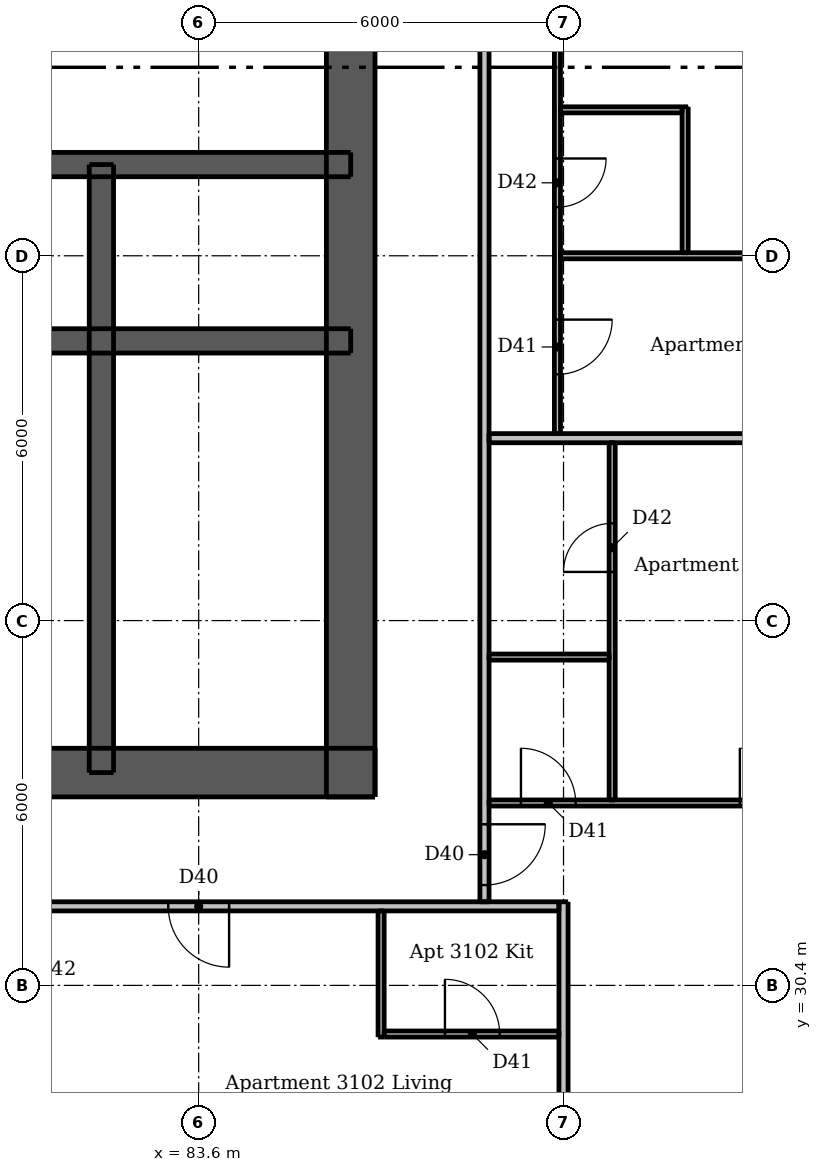
"""IFC4 building model, lengths in metres.
Left out: names, types, materials, properties, quantities, classifications, styles, units other than length and angle.
Written with IfcOpenShell. Run it as: python <this file> out.ifc"""

import sys

from ifc_helpers import new_model, si_unit, direction, frame, frame_2d, origin, place, context, subcontext, project, spatial, rectangle, extrude, element, fill, save


model = new_model("IFC4")
c1 = context("Model", 3, precision=1e-05, world=origin(), true_north=direction((0.0, 1.0)))
c2 = subcontext(c1, "Body", "Model", "MODEL_VIEW")
j1 = project(units=[si_unit("LENGTHUNIT", "METRE"), si_unit("PLANEANGLEUNIT", "RADIAN")], contexts=[c1])
p1 = place(None, origin())
s1 = spatial("IfcSite", under=j1, at=p1, CompositionType="ELEMENT")
p2 = place(p1, origin())
s2 = spatial("IfcBuilding", under=s1, at=p2, CompositionType="ELEMENT")
p3 = place(p2, frame((0.0, 0.0, 115.0)))
s3 = spatial("IfcBuildingStorey", under=s2, at=p3, CompositionType="ELEMENT", Elevation=115.0)
p4 = place(p3, frame((62.5, 33.9, 0.0), z_axis=(0.0, 0.0, 1.0), x_axis=(1.0, 0.0, 0.0)))
e1 = element("IfcWall", 1, at=p4, inside=s3, PredefinedType="SHEAR", context=c2, shape_type="SweptSolid", body=[
    extrude(rectangle(XDim=24.0, YDim=0.8, at=frame_2d((12.0, 0.0))), origin(), (0.0, 0.0, 1.0), 3.05),
])
p5 = place(p4, frame((2.0, 0.0, 0.0)))
e2 = element("IfcOpeningElement", 2, at=p5, cuts=e1, PredefinedType="OPENING", context=c2, shape_type="SweptSolid", body=[
    extrude(rectangle(XDim=1.1, YDim=2.1, at=frame_2d((0.55, 1.05))), frame((0.0, 0.41, 0.0), z_axis=(0.0, -1.0, 0.0), x_axis=(1.0, 0.0, 0.0)), (0.0, 0.0, 1.0), 0.82),
])
p6 = place(p4, frame((20.9, 0.0, 0.0)))
e3 = element("IfcOpeningElement", 3, at=p6, cuts=e1, PredefinedType="OPENING", context=c2, shape_type="SweptSolid", body=[
    extrude(rectangle(XDim=1.1, YDim=2.1, at=frame_2d((0.55, 1.05))), frame((0.0, 0.41, 0.0), z_axis=(0.0, -1.0, 0.0), x_axis=(1.0, 0.0, 0.0)), (0.0, 0.0, 1.0), 0.82),
])
p7 = place(p4, frame((8.0, 0.0, 0.0)))
e4 = element("IfcOpeningElement", 4, at=p7, cuts=e1, PredefinedType="OPENING", context=c2, shape_type="SweptSolid", body=[
    extrude(rectangle(XDim=1.1, YDim=2.1, at=frame_2d((0.55, 1.05))), frame((0.0, 0.41, 0.0), z_axis=(0.0, -1.0, 0.0), x_axis=(1.0, 0.0, 0.0)), (0.0, 0.0, 1.0), 0.82),
])
p8 = place(p4, frame((17.488, 0.0, 0.0)))
e5 = element("IfcOpeningElement", 5, at=p8, cuts=e1, PredefinedType="OPENING", context=c2, shape_type="SweptSolid", body=[
    extrude(rectangle(XDim=0.9, YDim=2.1, at=frame_2d((0.45, 1.05))), frame((0.0, 0.41, 0.0), z_axis=(0.0, -1.0, 0.0), x_axis=(1.0, 0.0, 0.0)), (0.0, 0.0, 1.0), 0.82),
])
p9 = place(p3, frame((86.1, 33.5, 0.0), z_axis=(0.0, 0.0, 1.0), x_axis=(0.0, 1.0, 0.0)))
e6 = element("IfcWall", 6, at=p9, inside=s3, PredefinedType="SHEAR", context=c2, shape_type="SweptSolid", body=[
    extrude(rectangle(XDim=24.0, YDim=0.8, at=frame_2d((12.0, 0.0))), origin(), (0.0, 0.0, 1.0), 3.05),
])
p10 = place(p9, frame((11.2, 0.0, 0.0)))
e7 = element("IfcOpeningElement", 7, at=p10, cuts=e6, PredefinedType="OPENING", context=c2, shape_type="SweptSolid", body=[
    extrude(rectangle(XDim=1.6, YDim=2.1, at=frame_2d((0.8, 1.05))), frame((0.0, 0.41, 0.0), z_axis=(0.0, -1.0, 0.0), x_axis=(1.0, 0.0, 0.0)), (0.0, 0.0, 1.0), 0.82),
])
p11 = place(p3, frame((62.9, 41.0, 0.0), z_axis=(0.0, 0.0, 1.0), x_axis=(1.0, 0.0, 0.0)))
e8 = element("IfcWall", 8, at=p11, inside=s3, PredefinedType="SHEAR", context=c2, shape_type="SweptSolid", body=[
    extrude(rectangle(XDim=23.2, YDim=0.4, at=frame_2d((11.6, 0.0))), origin(), (0.0, 0.0, 1.0), 3.05),
])
p12 = place(p3, frame((62.9, 43.9, 0.0), z_axis=(0.0, 0.0, 1.0), x_axis=(1.0, 0.0, 0.0)))
e9 = element("IfcWall", 9, at=p12, inside=s3, PredefinedType="SHEAR", context=c2, shape_type="SweptSolid", body=[
    extrude(rectangle(XDim=23.2, YDim=0.4, at=frame_2d((11.6, 0.0))), origin(), (0.0, 0.0, 1.0), 3.05),
])
p13 = place(p12, frame((1.7, 0.0, 0.0)))
e10 = element("IfcOpeningElement", 10, at=p13, cuts=e9, PredefinedType="OPENING", context=c2, shape_type="SweptSolid", body=[
    extrude(rectangle(XDim=0.9, YDim=2.1, at=frame_2d((0.45, 1.05))), frame((0.0, 0.21, 0.0), z_axis=(0.0, -1.0, 0.0), x_axis=(1.0, 0.0, 0.0)), (0.0, 0.0, 1.0), 0.42),
])
p14 = place(p12, frame((20.6, 0.0, 0.0)))
e11 = element("IfcOpeningElement", 11, at=p14, cuts=e9, PredefinedType="OPENING", context=c2, shape_type="SweptSolid", body=[
    extrude(rectangle(XDim=0.9, YDim=2.1, at=frame_2d((0.45, 1.05))), frame((0.0, 0.21, 0.0), z_axis=(0.0, -1.0, 0.0), x_axis=(1.0, 0.0, 0.0)), (0.0, 0.0, 1.0), 0.42),
])
p15 = place(p12, frame((4.8, 0.0, 0.0)))
e12 = element("IfcOpeningElement", 12, at=p15, cuts=e9, PredefinedType="OPENING", context=c2, shape_type="SweptSolid", body=[
    extrude(rectangle(XDim=1.1, YDim=2.1, at=frame_2d((0.55, 1.05))), frame((0.0, 0.21, 0.0), z_axis=(0.0, -1.0, 0.0), x_axis=(1.0, 0.0, 0.0)), (0.0, 0.0, 1.0), 0.42),
])
p16 = place(p12, frame((7.3, 0.0, 0.0)))
e13 = element("IfcOpeningElement", 13, at=p16, cuts=e9, PredefinedType="OPENING", context=c2, shape_type="SweptSolid", body=[
    extrude(rectangle(XDim=1.1, YDim=2.1, at=frame_2d((0.55, 1.05))), frame((0.0, 0.21, 0.0), z_axis=(0.0, -1.0, 0.0), x_axis=(1.0, 0.0, 0.0)), (0.0, 0.0, 1.0), 0.42),
])
p17 = place(p12, frame((9.8, 0.0, 0.0)))
e14 = element("IfcOpeningElement", 14, at=p17, cuts=e9, PredefinedType="OPENING", context=c2, shape_type="SweptSolid", body=[
    extrude(rectangle(XDim=1.1, YDim=2.1, at=frame_2d((0.55, 1.05))), frame((0.0, 0.21, 0.0), z_axis=(0.0, -1.0, 0.0), x_axis=(1.0, 0.0, 0.0)), (0.0, 0.0, 1.0), 0.42),
])
p18 = place(p12, frame((12.3, 0.0, 0.0)))
e15 = element("IfcOpeningElement", 15, at=p18, cuts=e9, PredefinedType="OPENING", context=c2, shape_type="SweptSolid", body=[
    extrude(rectangle(XDim=1.1, YDim=2.1, at=frame_2d((0.55, 1.05))), frame((0.0, 0.21, 0.0), z_axis=(0.0, -1.0, 0.0), x_axis=(1.0, 0.0, 0.0)), (0.0, 0.0, 1.0), 0.42),
])
p19 = place(p12, frame((14.8, 0.0, 0.0)))
e16 = element("IfcOpeningElement", 16, at=p19, cuts=e9, PredefinedType="OPENING", context=c2, shape_type="SweptSolid", body=[
    extrude(rectangle(XDim=1.1, YDim=2.1, at=frame_2d((0.55, 1.05))), frame((0.0, 0.21, 0.0), z_axis=(0.0, -1.0, 0.0), x_axis=(1.0, 0.0, 0.0)), (0.0, 0.0, 1.0), 0.42),
])
p20 = place(p12, frame((17.3, 0.0, 0.0)))
e17 = element("IfcOpeningElement", 17, at=p20, cuts=e9, PredefinedType="OPENING", context=c2, shape_type="SweptSolid", body=[
    extrude(rectangle(XDim=1.1, YDim=2.1, at=frame_2d((0.55, 1.05))), frame((0.0, 0.21, 0.0), z_axis=(0.0, -1.0, 0.0), x_axis=(1.0, 0.0, 0.0)), (0.0, 0.0, 1.0), 0.42),
])
p21 = place(p3, frame((82.0, 33.9, 0.0), z_axis=(0.0, 0.0, 1.0), x_axis=(0.0, 1.0, 0.0)))
e18 = element("IfcWall", 18, at=p21, inside=s3, PredefinedType="SHEAR", context=c2, shape_type="SweptSolid", body=[
    extrude(rectangle(XDim=10.0, YDim=0.4, at=frame_2d((5.0, 0.0))), origin(), (0.0, 0.0, 1.0), 3.05),
])
p22 = place(p3, frame((86.6, 29.55, 0.0), z_axis=(0.0, 0.0, 1.0), x_axis=(0.0, 1.0, 0.0)))
e19 = element("IfcWall", 19, at=p22, inside=s3, PredefinedType="PARTITIONING", context=c2, shape_type="SweptSolid", body=[
    extrude(rectangle(XDim=2.075, YDim=0.1, at=frame_2d((1.038, 0.0))), origin(), (0.0, 0.0, 1.0), 3.05),
])
p23 = place(p3, frame((89.5, 54.325, 0.0), z_axis=(0.0, 0.0, 1.0), x_axis=(0.0, -1.0, 0.0)))
e20 = element("IfcWall", 20, at=p23, inside=s3, PredefinedType="PARTITIONING", context=c2, shape_type="SweptSolid", body=[
    extrude(rectangle(XDim=14.85, YDim=0.1, at=frame_2d((7.425, 0.0))), origin(), (0.0, 0.0, 1.0), 3.05),
])
p24 = place(p23, frame((5.775, 0.0, 0.0)))
e21 = element("IfcOpeningElement", 21, at=p24, cuts=e20, PredefinedType="OPENING", context=c2, shape_type="SweptSolid", body=[
    extrude(rectangle(XDim=0.9, YDim=2.1, at=frame_2d((0.45, 1.05))), frame((0.0, 0.06, 0.0), z_axis=(0.0, -1.0, 0.0), x_axis=(1.0, 0.0, 0.0)), (0.0, 0.0, 1.0), 0.12),
])
p25 = place(p23, frame((0.975, 0.0, 0.0)))
e22 = element("IfcOpeningElement", 22, at=p25, cuts=e20, PredefinedType="OPENING", context=c2, shape_type="SweptSolid", body=[
    extrude(rectangle(XDim=0.9, YDim=2.1, at=frame_2d((0.45, 1.05))), frame((0.0, 0.06, 0.0), z_axis=(0.0, -1.0, 0.0), x_axis=(1.0, 0.0, 0.0)), (0.0, 0.0, 1.0), 0.12),
])
p26 = place(p23, frame((12.975, 0.0, 0.0)))
e23 = element("IfcOpeningElement", 23, at=p26, cuts=e20, PredefinedType="OPENING", context=c2, shape_type="SweptSolid", body=[
    extrude(rectangle(XDim=0.9, YDim=2.1, at=frame_2d((0.45, 1.05))), frame((0.0, 0.06, 0.0), z_axis=(0.0, -1.0, 0.0), x_axis=(1.0, 0.0, 0.0)), (0.0, 0.0, 1.0), 0.12),
])
p27 = place(p23, frame((10.325, 0.0, 0.0)))
e24 = element("IfcOpeningElement", 24, at=p27, cuts=e20, PredefinedType="OPENING", context=c2, shape_type="SweptSolid", body=[
    extrude(rectangle(XDim=0.8, YDim=2.1, at=frame_2d((0.4, 1.05))), frame((0.0, 0.06, 0.0), z_axis=(0.0, -1.0, 0.0), x_axis=(1.0, 0.0, 0.0)), (0.0, 0.0, 1.0), 0.12),
])
p28 = place(p3, frame((90.4, 33.45, 0.0), z_axis=(0.0, 0.0, 1.0), x_axis=(0.0, 1.0, 0.0)))
e25 = element("IfcWall", 25, at=p28, inside=s3, PredefinedType="PARTITIONING", context=c2, shape_type="SweptSolid", body=[
    extrude(rectangle(XDim=5.875, YDim=0.1, at=frame_2d((2.938, 0.0))), origin(), (0.0, 0.0, 1.0), 3.05),
])
p29 = place(p28, frame((3.75, 0.0, 0.0)))
e26 = element("IfcOpeningElement", 26, at=p29, cuts=e25, PredefinedType="OPENING", context=c2, shape_type="SweptSolid", body=[
    extrude(rectangle(XDim=0.8, YDim=2.1, at=frame_2d((0.4, 1.05))), frame((0.0, 0.06, 0.0), z_axis=(0.0, -1.0, 0.0), x_axis=(1.0, 0.0, 0.0)), (0.0, 0.0, 1.0), 0.12),
])
p30 = place(p3, frame((91.6, 42.45, 0.0), z_axis=(0.0, 0.0, 1.0), x_axis=(0.0, 1.0, 0.0)))
e27 = element("IfcWall", 27, at=p30, inside=s3, PredefinedType="PARTITIONING", context=c2, shape_type="SweptSolid", body=[
    extrude(rectangle(XDim=2.4, YDim=0.1, at=frame_2d((1.2, 0.0))), origin(), (0.0, 0.0, 1.0), 3.05),
])
p31 = place(p3, frame((89.55, 44.8, 0.0), z_axis=(0.0, 0.0, 1.0), x_axis=(1.0, 0.0, 0.0)))
e28 = element("IfcWall", 28, at=p31, inside=s3, PredefinedType="PARTITIONING", context=c2, shape_type="SweptSolid", body=[
    extrude(rectangle(XDim=2.0, YDim=0.1, at=frame_2d((1.0, 0.0))), origin(), (0.0, 0.0, 1.0), 3.05),
])
p32 = place(p3, frame((89.55, 42.4, 0.0), z_axis=(0.0, 0.0, 1.0), x_axis=(1.0, 0.0, 0.0)))
e29 = element("IfcWall", 29, at=p32, inside=s3, PredefinedType="PARTITIONING", context=c2, shape_type="SweptSolid", body=[
    extrude(rectangle(XDim=7.45, YDim=0.1, at=frame_2d((3.725, 0.0))), origin(), (0.0, 0.0, 1.0), 2.516),
])
p33 = place(p3, frame((88.375, 35.8, 0.0), z_axis=(0.0, 0.0, 1.0), x_axis=(1.0, 0.0, 0.0)))
e30 = element("IfcWall", 30, at=p33, inside=s3, PredefinedType="PARTITIONING", context=c2, shape_type="SweptSolid", body=[
    extrude(rectangle(XDim=1.975, YDim=0.1, at=frame_2d((0.988, 0.0))), origin(), (0.0, 0.0, 1.0), 3.05),
])
p34 = place(p3, frame((88.375, 33.4, 0.0), z_axis=(0.0, 0.0, 1.0), x_axis=(1.0, 0.0, 0.0)))
e31 = element("IfcWall", 31, at=p34, inside=s3, PredefinedType="PARTITIONING", context=c2, shape_type="SweptSolid", body=[
    extrude(rectangle(XDim=7.125, YDim=0.1, at=frame_2d((3.562, 0.0))), origin(), (0.0, 0.0, 1.0), 3.05),
])
p35 = place(p34, frame((0.525, 0.0, 0.0)))
e32 = element("IfcOpeningElement", 32, at=p35, cuts=e31, PredefinedType="OPENING", context=c2, shape_type="SweptSolid", body=[
    extrude(rectangle(XDim=0.9, YDim=2.1, at=frame_2d((0.45, 1.05))), frame((0.0, 0.06, 0.0), z_axis=(0.0, -1.0, 0.0), x_axis=(1.0, 0.0, 0.0)), (0.0, 0.0, 1.0), 0.12),
])
p36 = place(p34, frame((4.125, 0.0, 0.0)))
e33 = element("IfcOpeningElement", 33, at=p36, cuts=e31, PredefinedType="OPENING", context=c2, shape_type="SweptSolid", body=[
    extrude(rectangle(XDim=0.9, YDim=2.1, at=frame_2d((0.45, 1.05))), frame((0.0, 0.06, 0.0), z_axis=(0.0, -1.0, 0.0), x_axis=(1.0, 0.0, 0.0)), (0.0, 0.0, 1.0), 0.12),
])
p37 = place(p3, frame((86.65, 29.6, 0.0), z_axis=(0.0, 0.0, 1.0), x_axis=(1.0, 0.0, 0.0)))
e34 = element("IfcWall", 34, at=p37, inside=s3, PredefinedType="PARTITIONING", context=c2, shape_type="SweptSolid", body=[
    extrude(rectangle(XDim=2.875, YDim=0.1, at=frame_2d((1.438, 0.0))), origin(), (0.0, 0.0, 1.0), 3.05),
])
p38 = place(p37, frame((1.0, 0.0, 0.0)))
e35 = element("IfcOpeningElement", 35, at=p38, cuts=e34, PredefinedType="OPENING", context=c2, shape_type="SweptSolid", body=[
    extrude(rectangle(XDim=0.9, YDim=2.1, at=frame_2d((0.45, 1.05))), frame((0.0, 0.06, 0.0), z_axis=(0.0, -1.0, 0.0), x_axis=(1.0, 0.0, 0.0)), (0.0, 0.0, 1.0), 0.12),
])
p39 = place(p3, frame((88.3, 60.475, 0.0), z_axis=(0.0, 0.0, 1.0), x_axis=(0.0, -1.0, 0.0)))
e36 = element("IfcWall", 36, at=p39, inside=s3, PredefinedType="PARTITIONING", context=c2, shape_type="SweptSolid", body=[
    extrude(rectangle(XDim=28.7, YDim=0.15, at=frame_2d((14.35, 0.0))), origin(), (0.0, 0.0, 1.0), 3.05),
])
p40 = place(p39, frame((27.425, 0.0, 0.0)))
e37 = element("IfcOpeningElement", 37, at=p40, cuts=e36, PredefinedType="OPENING", context=c2, shape_type="SweptSolid", body=[
    extrude(rectangle(XDim=1.0, YDim=2.1, at=frame_2d((0.5, 1.05))), frame((0.0, 0.085, 0.0), z_axis=(0.0, -1.0, 0.0), x_axis=(1.0, 0.0, 0.0)), (0.0, 0.0, 1.0), 0.17),
])
p41 = place(p39, frame((13.075, 0.0, 0.0)))
e38 = element("IfcOpeningElement", 38, at=p41, cuts=e36, PredefinedType="OPENING", context=c2, shape_type="SweptSolid", body=[
    extrude(rectangle(XDim=1.0, YDim=2.1, at=frame_2d((0.5, 1.05))), frame((0.0, 0.085, 0.0), z_axis=(0.0, -1.0, 0.0), x_axis=(1.0, 0.0, 0.0)), (0.0, 0.0, 1.0), 0.17),
])
p42 = place(p39, frame((2.575, 0.0, 0.0)))
e39 = element("IfcOpeningElement", 39, at=p42, cuts=e36, PredefinedType="OPENING", context=c2, shape_type="SweptSolid", body=[
    extrude(rectangle(XDim=1.0, YDim=2.1, at=frame_2d((0.5, 1.05))), frame((0.0, 0.085, 0.0), z_axis=(0.0, -1.0, 0.0), x_axis=(1.0, 0.0, 0.0)), (0.0, 0.0, 1.0), 0.17),
])
p43 = place(p3, frame((89.6, 26.0, 0.0), z_axis=(0.0, 0.0, 1.0), x_axis=(0.0, 1.0, 0.0)))
e40 = element("IfcWall", 40, at=p43, inside=s3, PredefinedType="PARTITIONING", context=c2, shape_type="SweptSolid", body=[
    extrude(rectangle(XDim=5.775, YDim=0.15, at=frame_2d((2.887, 0.0))), origin(), (0.0, 0.0, 1.0), 2.516),
])
p44 = place(p3, frame((88.375, 39.4, 0.0), z_axis=(0.0, 0.0, 1.0), x_axis=(1.0, 0.0, 0.0)))
e41 = element("IfcWall", 41, at=p44, inside=s3, PredefinedType="PARTITIONING", context=c2, shape_type="SweptSolid", body=[
    extrude(rectangle(XDim=8.625, YDim=0.15, at=frame_2d((4.312, 0.0))), origin(), (0.0, 0.0, 1.0), 3.05),
])
p45 = place(p3, frame((89.525, 31.7, 0.0), z_axis=(0.0, 0.0, 1.0), x_axis=(-1.0, 0.0, 0.0)))
e42 = element("IfcWall", 42, at=p45, inside=s3, PredefinedType="PARTITIONING", context=c2, shape_type="SweptSolid", body=[
    extrude(rectangle(XDim=28.75, YDim=0.15, at=frame_2d((14.375, 0.0))), origin(), (0.0, 0.0, 1.0), 3.05),
])
p46 = place(p45, frame((24.625, 0.0, 0.0)))
e43 = element("IfcOpeningElement", 43, at=p46, cuts=e42, PredefinedType="OPENING", context=c2, shape_type="SweptSolid", body=[
    extrude(rectangle(XDim=1.0, YDim=2.1, at=frame_2d((0.5, 1.05))), frame((0.0, 0.085, 0.0), z_axis=(0.0, -1.0, 0.0), x_axis=(1.0, 0.0, 0.0)), (0.0, 0.0, 1.0), 0.17),
])
p47 = place(p45, frame((5.425, 0.0, 0.0)))
e44 = element("IfcOpeningElement", 44, at=p47, cuts=e42, PredefinedType="OPENING", context=c2, shape_type="SweptSolid", body=[
    extrude(rectangle(XDim=1.0, YDim=2.1, at=frame_2d((0.5, 1.05))), frame((0.0, 0.085, 0.0), z_axis=(0.0, -1.0, 0.0), x_axis=(1.0, 0.0, 0.0)), (0.0, 0.0, 1.0), 0.17),
])
p48 = place(p6, origin())
e45 = element("IfcDoor", 45, at=p48, inside=s3, OperationType="SINGLE_SWING_RIGHT", PredefinedType="DOOR", context=c2, shape_type="SweptSolid", body=[
    extrude(rectangle(XDim=1.1, YDim=2.1, at=frame_2d((0.55, 1.05))), frame((0.0, 0.388, 0.0), z_axis=(0.0, -1.0, 0.0), x_axis=(1.0, 0.0, 0.0)), (0.0, 0.0, 1.0), 0.05),
])
fill(e3, e45)
p49 = place(p10, origin())
e46 = element("IfcDoor", 46, at=p49, inside=s3, OperationType="DOUBLE_DOOR_SINGLE_SWING", PredefinedType="DOOR", context=c2, shape_type="SweptSolid", body=[
    extrude(rectangle(XDim=1.6, YDim=2.1, at=frame_2d((0.8, 1.05))), frame((0.0, 0.388, 0.0), z_axis=(0.0, -1.0, 0.0), x_axis=(1.0, 0.0, 0.0)), (0.0, 0.0, 1.0), 0.05),
])
fill(e7, e46)
p50 = place(p14, origin())
e47 = element("IfcDoor", 47, at=p50, inside=s3, OperationType="SINGLE_SWING_LEFT", PredefinedType="DOOR", context=c2, shape_type="SweptSolid", body=[
    extrude(rectangle(XDim=0.9, YDim=2.1, at=frame_2d((0.45, 1.05))), frame((0.0, -0.138, 0.0), z_axis=(0.0, -1.0, 0.0), x_axis=(1.0, 0.0, 0.0)), (0.0, 0.0, 1.0), 0.05),
])
fill(e11, e47)
p51 = place(p20, origin())
e48 = element("IfcDoor", 48, at=p51, inside=s3, OperationType="DOUBLE_DOOR_SLIDING", PredefinedType="DOOR", context=c2, shape_type="SweptSolid", body=[
    extrude(rectangle(XDim=1.1, YDim=2.1, at=frame_2d((0.55, 1.05))), frame((0.0, 0.025, 0.0), z_axis=(0.0, -1.0, 0.0), x_axis=(1.0, 0.0, 0.0)), (0.0, 0.0, 1.0), 0.05),
])
fill(e17, e48)
p52 = place(p47, origin())
e49 = element("IfcDoor", 49, at=p52, inside=s3, OperationType="SINGLE_SWING_LEFT", PredefinedType="DOOR", context=c2, shape_type="SweptSolid", body=[
    extrude(rectangle(XDim=1.0, YDim=2.1, at=frame_2d((0.5, 1.05))), frame((0.0, 0.025, 0.0), z_axis=(0.0, -1.0, 0.0), x_axis=(1.0, 0.0, 0.0)), (0.0, 0.0, 1.0), 0.05),
])
fill(e44, e49)
p53 = place(p38, origin())
e50 = element("IfcDoor", 50, at=p53, inside=s3, OperationType="SINGLE_SWING_LEFT", PredefinedType="DOOR", context=c2, shape_type="SweptSolid", body=[
    extrude(rectangle(XDim=0.9, YDim=2.1, at=frame_2d((0.45, 1.05))), frame((0.0, 0.025, 0.0), z_axis=(0.0, -1.0, 0.0), x_axis=(1.0, 0.0, 0.0)), (0.0, 0.0, 1.0), 0.05),
])
fill(e35, e50)
p54 = place(p40, origin())
e51 = element("IfcDoor", 51, at=p54, inside=s3, OperationType="SINGLE_SWING_LEFT", PredefinedType="DOOR", context=c2, shape_type="SweptSolid", body=[
    extrude(rectangle(XDim=1.0, YDim=2.1, at=frame_2d((0.5, 1.05))), frame((0.0, 0.025, 0.0), z_axis=(0.0, -1.0, 0.0), x_axis=(1.0, 0.0, 0.0)), (0.0, 0.0, 1.0), 0.05),
])
fill(e37, e51)
p55 = place(p35, origin())
e52 = element("IfcDoor", 52, at=p55, inside=s3, OperationType="SINGLE_SWING_LEFT", PredefinedType="DOOR", context=c2, shape_type="SweptSolid", body=[
    extrude(rectangle(XDim=0.9, YDim=2.1, at=frame_2d((0.45, 1.05))), frame((0.0, 0.025, 0.0), z_axis=(0.0, -1.0, 0.0), x_axis=(1.0, 0.0, 0.0)), (0.0, 0.0, 1.0), 0.05),
])
fill(e32, e52)
p56 = place(p36, origin())
e53 = element("IfcDoor", 53, at=p56, inside=s3, OperationType="SINGLE_SWING_LEFT", PredefinedType="DOOR", context=c2, shape_type="SweptSolid", body=[
    extrude(rectangle(XDim=0.9, YDim=2.1, at=frame_2d((0.45, 1.05))), frame((0.0, 0.025, 0.0), z_axis=(0.0, -1.0, 0.0), x_axis=(1.0, 0.0, 0.0)), (0.0, 0.0, 1.0), 0.05),
])
fill(e33, e53)
p57 = place(p29, origin())
e54 = element("IfcDoor", 54, at=p57, inside=s3, OperationType="SINGLE_SWING_LEFT", PredefinedType="DOOR", context=c2, shape_type="SweptSolid", body=[
    extrude(rectangle(XDim=0.8, YDim=2.1, at=frame_2d((0.4, 1.05))), frame((0.0, 0.025, 0.0), z_axis=(0.0, -1.0, 0.0), x_axis=(1.0, 0.0, 0.0)), (0.0, 0.0, 1.0), 0.05),
])
fill(e26, e54)
p58 = place(p26, origin())
e55 = element("IfcDoor", 55, at=p58, inside=s3, OperationType="SINGLE_SWING_LEFT", PredefinedType="DOOR", context=c2, shape_type="SweptSolid", body=[
    extrude(rectangle(XDim=0.9, YDim=2.1, at=frame_2d((0.45, 1.05))), frame((0.0, 0.025, 0.0), z_axis=(0.0, -1.0, 0.0), x_axis=(1.0, 0.0, 0.0)), (0.0, 0.0, 1.0), 0.05),
])
fill(e23, e55)
p59 = place(p27, origin())
e56 = element("IfcDoor", 56, at=p59, inside=s3, OperationType="SINGLE_SWING_LEFT", PredefinedType="DOOR", context=c2, shape_type="SweptSolid", body=[
    extrude(rectangle(XDim=0.8, YDim=2.1, at=frame_2d((0.4, 1.05))), frame((0.0, 0.025, 0.0), z_axis=(0.0, -1.0, 0.0), x_axis=(1.0, 0.0, 0.0)), (0.0, 0.0, 1.0), 0.05),
])
fill(e24, e56)
save(model, sys.argv[1])
